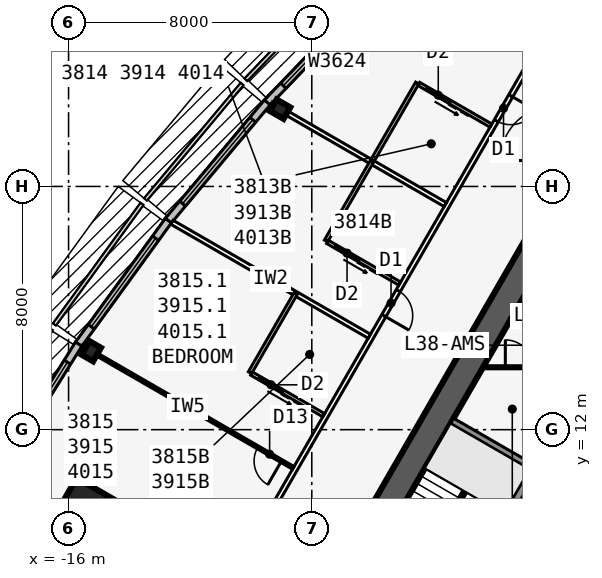
"""IFC4 building model, lengths in metres.
Left out: names, types, materials, properties, quantities, classifications, styles, units other than length and angle.
Written with IfcOpenShell. Run it as: python <this file> out.ifc"""

import sys

from ifc_helpers import new_model, si_unit, direction, frame, frame_2d, origin, origin_2d, place, context, subcontext, project, spatial, rectangle, i_section, extrude, element, fill, save


model = new_model("IFC4")
c1 = context("Model", 3, precision=1e-05, world=origin(), true_north=direction((0.0, 1.0)))
c2 = subcontext(c1, "Body", "Model", "MODEL_VIEW")
j1 = project(units=[si_unit("LENGTHUNIT", "METRE"), si_unit("PLANEANGLEUNIT", "RADIAN")], contexts=[c1])
p1 = place(None, origin())
s1 = spatial("IfcSite", under=j1, at=p1, CompositionType="ELEMENT")
p2 = place(p1, origin())
s2 = spatial("IfcBuilding", under=s1, at=p2, CompositionType="ELEMENT")
p3 = place(p2, frame((0.0, 0.0, 145.3)))
s3 = spatial("IfcBuildingStorey", under=s2, at=p3, CompositionType="ELEMENT", Elevation=145.3)
p4 = place(p3, frame((0.0, 19.052, 0.0), z_axis=(0.0, 0.0, 1.0), x_axis=(-0.499999749417, -0.866025548458, 0.0)))
e1 = element("IfcWall", 1, at=p4, inside=s3, PredefinedType="SHEAR", context=c2, shape_type="SweptSolid", body=[
    extrude(rectangle(XDim=33.0, YDim=0.9, at=frame_2d((16.5, 0.0))), origin(), (0.0, 0.0, 1.0), 3.4),
])
p5 = place(p4, frame((14.15, 0.0, 0.0)))
e2 = element("IfcOpeningElement", 2, at=p5, cuts=e1, PredefinedType="OPENING", context=c2, shape_type="SweptSolid", body=[
    extrude(rectangle(XDim=1.8, YDim=2.13, at=frame_2d((0.9, 1.065))), frame((0.0, 0.46, 0.0), z_axis=(0.0, -1.0, 0.0), x_axis=(1.0, 0.0, 0.0)), (0.0, 0.0, 1.0), 0.92),
])
p6 = place(p4, frame((12.6, 0.0, 0.0)))
e3 = element("IfcOpeningElement", 3, at=p6, cuts=e1, PredefinedType="OPENING", context=c2, shape_type="SweptSolid", body=[
    extrude(rectangle(XDim=1.0, YDim=2.13, at=frame_2d((0.5, 1.065))), frame((0.0, 0.46, 0.0), z_axis=(0.0, -1.0, 0.0), x_axis=(1.0, 0.0, 0.0)), (0.0, 0.0, 1.0), 0.92),
])
p7 = place(p3, frame((-0.062, 11.794, 0.0), z_axis=(0.0, 0.0, 1.0), x_axis=(-0.500006680225, -0.86602154692, 0.0)))
e4 = element("IfcWall", 4, at=p7, inside=s3, PredefinedType="SOLIDWALL", context=c2, shape_type="SweptSolid", body=[
    extrude(rectangle(XDim=7.733, YDim=0.25, at=frame_2d((3.866, 0.0))), origin(), (0.0, 0.0, 1.0), 3.235),
])
p8 = place(p3, frame((-0.679, 10.727, 0.0), z_axis=(0.0, 0.0, 1.0), x_axis=(-0.866022959057, 0.500004234368, 0.0)))
e5 = element("IfcWall", 5, at=p8, inside=s3, PredefinedType="SOLIDWALL", context=c2, shape_type="SweptSolid", body=[
    extrude(rectangle(XDim=3.125, YDim=0.2, at=frame_2d((1.562, 0.0))), origin(), (0.0, 0.0, 1.0), 3.235),
])
for number, where, z_axis, x_axis in (
    (6, (-9.041, 22.541, 0.0), (0.0, 0.0, 1.0), (-0.5, -0.866, 0.0)),
    (7, (-15.254, 14.58, 0.0), (0.0, 0.0, 1.0), (-0.866, 0.5, 0.0)),
):
    element("IfcColumn", number, at=place(p3, frame(where, z_axis=z_axis, x_axis=x_axis)), inside=s3, PredefinedType="COLUMN", context=c2, shape_type="SweptSolid", body=[
        extrude(i_section(OverallWidth=0.437, OverallDepth=0.513, WebThickness=0.061, FlangeThickness=0.097, at=origin_2d()), origin(), (0.0, 0.0, 1.0), 3.4),
    ])
p9 = place(p3, frame((-15.312, 8.84, 0.0), z_axis=(0.0, 0.0, 1.0), x_axis=(-0.866025403784, 0.5, 0.0)))
e8 = element("IfcColumn", 8, at=p9, inside=s3, PredefinedType="COLUMN", context=c2, shape_type="SweptSolid", body=[
    extrude(rectangle(XDim=2.3, YDim=2.3, at=origin_2d()), origin(), (0.0, 0.0, 1.0), 3.4),
])
p10 = place(p3, frame((-5.91, 26.472, 0.0), z_axis=(0.0, 0.0, 1.0), x_axis=(-0.691719937936, -0.722165858693, 0.0)))
e9 = element("IfcWall", 9, at=p10, inside=s3, PredefinedType="STANDARD", context=c2, shape_type="SweptSolid", body=[
    extrude(rectangle(XDim=5.148, YDim=0.25, at=frame_2d((2.574, 0.0))), origin(), (0.0, 0.0, 1.0), 3.235),
])
p11 = place(p10, frame((0.774, 0.0, 0.45)))
e10 = element("IfcOpeningElement", 10, at=p11, cuts=e9, PredefinedType="OPENING", context=c2, shape_type="SweptSolid", body=[
    extrude(rectangle(XDim=3.6, YDim=2.4, at=frame_2d((1.8, 1.2))), frame((0.0, 0.135, 0.0), z_axis=(0.0, -1.0, 0.0), x_axis=(1.0, 0.0, 0.0)), (0.0, 0.0, 1.0), 0.27),
])
p12 = place(p3, frame((-9.465, 22.76, 0.0), z_axis=(0.0, 0.0, 1.0), x_axis=(-0.641810386606, -0.766863369607, 0.0)))
e11 = element("IfcWall", 11, at=p12, inside=s3, PredefinedType="STANDARD", context=c2, shape_type="SweptSolid", body=[
    extrude(rectangle(XDim=5.076, YDim=0.25, at=frame_2d((2.538, 0.0))), origin(), (0.0, 0.0, 1.0), 3.235),
])
p13 = place(p12, frame((0.738, 0.0, 0.45)))
e12 = element("IfcOpeningElement", 12, at=p13, cuts=e11, PredefinedType="OPENING", context=c2, shape_type="SweptSolid", body=[
    extrude(rectangle(XDim=3.6, YDim=2.4, at=frame_2d((1.8, 1.2))), frame((0.0, 0.135, 0.0), z_axis=(0.0, -1.0, 0.0), x_axis=(1.0, 0.0, 0.0)), (0.0, 0.0, 1.0), 0.27),
])
p14 = place(p3, frame((-12.718, 18.875, 0.0), z_axis=(0.0, 0.0, 1.0), x_axis=(-0.587669188412, -0.809101307001, 0.0)))
e13 = element("IfcWall", 13, at=p14, inside=s3, PredefinedType="STANDARD", context=c2, shape_type="SweptSolid", body=[
    extrude(rectangle(XDim=5.028, YDim=0.25, at=frame_2d((2.514, 0.0))), origin(), (0.0, 0.0, 1.0), 3.235),
])
p15 = place(p14, frame((0.714, 0.0, 0.45)))
e14 = element("IfcOpeningElement", 14, at=p15, cuts=e13, PredefinedType="OPENING", context=c2, shape_type="SweptSolid", body=[
    extrude(rectangle(XDim=3.6, YDim=2.4, at=frame_2d((1.8, 1.2))), frame((0.0, 0.135, 0.0), z_axis=(0.0, -1.0, 0.0), x_axis=(1.0, 0.0, 0.0)), (0.0, 0.0, 1.0), 0.27),
])
p16 = place(p3, frame((-15.667, 14.814, 0.0), z_axis=(0.0, 0.0, 1.0), x_axis=(-0.529990167382, -0.84800378683, 0.0)))
e15 = element("IfcWall", 15, at=p16, inside=s3, PredefinedType="STANDARD", context=c2, shape_type="SweptSolid", body=[
    extrude(rectangle(XDim=5.003, YDim=0.25, at=frame_2d((2.501, 0.0))), origin(), (0.0, 0.0, 1.0), 3.235),
])
p17 = place(p16, frame((0.701, 0.0, 0.45)))
e16 = element("IfcOpeningElement", 16, at=p17, cuts=e15, PredefinedType="OPENING", context=c2, shape_type="SweptSolid", body=[
    extrude(rectangle(XDim=3.6, YDim=2.4, at=frame_2d((1.8, 1.2))), frame((0.0, 0.135, 0.0), z_axis=(0.0, -1.0, 0.0), x_axis=(1.0, 0.0, 0.0)), (0.0, 0.0, 1.0), 0.27),
])
p18 = place(p3, frame((-0.5, 24.636, 0.0), z_axis=(0.0, 0.0, 1.0), x_axis=(-0.500001915564, -0.86602429783, 0.0)))
e17 = element("IfcWall", 17, at=p18, inside=s3, PredefinedType="PARTITIONING", context=c2, shape_type="SweptSolid", body=[
    extrude(rectangle(XDim=42.172, YDim=0.15, at=frame_2d((21.086, 0.0))), origin(), (0.0, 0.0, 1.0), 3.235),
])
p19 = place(p18, frame((1.911, 0.0, 0.0)))
e18 = element("IfcOpeningElement", 18, at=p19, cuts=e17, PredefinedType="OPENING", context=c2, shape_type="SweptSolid", body=[
    extrude(rectangle(XDim=0.95, YDim=2.13, at=frame_2d((0.475, 1.065))), frame((0.0, 0.085, 0.0), z_axis=(0.0, -1.0, 0.0), x_axis=(1.0, 0.0, 0.0)), (0.0, 0.0, 1.0), 0.17),
])
p20 = place(p18, frame((9.311, 0.0, 0.0)))
e19 = element("IfcOpeningElement", 19, at=p20, cuts=e17, PredefinedType="OPENING", context=c2, shape_type="SweptSolid", body=[
    extrude(rectangle(XDim=0.95, YDim=2.13, at=frame_2d((0.475, 1.065))), frame((0.0, 0.085, 0.0), z_axis=(0.0, -1.0, 0.0), x_axis=(1.0, 0.0, 0.0)), (0.0, 0.0, 1.0), 0.17),
])
p21 = place(p18, frame((18.111, 0.0, 0.0)))
e20 = element("IfcOpeningElement", 20, at=p21, cuts=e17, PredefinedType="OPENING", context=c2, shape_type="SweptSolid", body=[
    extrude(rectangle(XDim=0.95, YDim=2.13, at=frame_2d((0.475, 1.065))), frame((0.0, 0.085, 0.0), z_axis=(0.0, -1.0, 0.0), x_axis=(1.0, 0.0, 0.0)), (0.0, 0.0, 1.0), 0.17),
])
p22 = place(p18, frame((29.311, 0.0, 0.0)))
e21 = element("IfcOpeningElement", 21, at=p22, cuts=e17, PredefinedType="OPENING", context=c2, shape_type="SweptSolid", body=[
    extrude(rectangle(XDim=0.95, YDim=2.13, at=frame_2d((0.475, 1.065))), frame((0.0, 0.085, 0.0), z_axis=(0.0, -1.0, 0.0), x_axis=(1.0, 0.0, 0.0)), (0.0, 0.0, 1.0), 0.17),
])
p23 = place(p18, frame((39.311, 0.0, 0.0)))
e22 = element("IfcOpeningElement", 22, at=p23, cuts=e17, PredefinedType="OPENING", context=c2, shape_type="SweptSolid", body=[
    extrude(rectangle(XDim=0.95, YDim=2.13, at=frame_2d((0.475, 1.065))), frame((0.0, 0.085, 0.0), z_axis=(0.0, -1.0, 0.0), x_axis=(1.0, 0.0, 0.0)), (0.0, 0.0, 1.0), 0.17),
])
p24 = place(p3, frame((-3.608, 19.404, 0.0), z_axis=(0.0, 0.0, 1.0), x_axis=(-0.866015989873, 0.500016305018, 0.0)))
e23 = element("IfcWall", 23, at=p24, inside=s3, PredefinedType="PARTITIONING", context=c2, shape_type="SweptSolid", body=[
    extrude(rectangle(XDim=6.616, YDim=0.15, at=frame_2d((3.308, 0.0))), origin(), (0.0, 0.0, 1.0), 2.389),
])
p25 = place(p3, frame((-6.108, 15.073, 0.0), z_axis=(0.0, 0.0, 1.0), x_axis=(-0.866025567496, 0.499999716443, 0.0)))
e24 = element("IfcWall", 24, at=p25, inside=s3, PredefinedType="PARTITIONING", context=c2, shape_type="SweptSolid", body=[
    extrude(rectangle(XDim=7.495, YDim=0.15, at=frame_2d((3.748, 0.0))), origin(), (0.0, 0.0, 1.0), 2.389),
])
p26 = place(p3, frame((-8.608, 10.743, 0.0), z_axis=(0.0, 0.0, 1.0), x_axis=(-0.866041663918, 0.499971835565, 0.0)))
e25 = element("IfcWall", 25, at=p26, inside=s3, PredefinedType="PARTITIONING", context=c2, shape_type="SweptSolid", body=[
    extrude(rectangle(XDim=8.022, YDim=0.1, at=frame_2d((4.011, 0.0))), origin(), (0.0, 0.0, 1.0), 2.389),
])
p27 = place(p26, frame((0.45, 0.0, 0.0)))
e26 = element("IfcOpeningElement", 26, at=p27, cuts=e25, PredefinedType="OPENING", context=c2, shape_type="SweptSolid", body=[
    extrude(rectangle(XDim=0.9, YDim=2.13, at=frame_2d((0.45, 1.065))), frame((0.0, 0.06, 0.0), z_axis=(0.0, -1.0, 0.0), x_axis=(1.0, 0.0, 0.0)), (0.0, 0.0, 1.0), 0.12),
])
p28 = place(p3, frame((-11.108, 6.413, 0.0), z_axis=(0.0, 0.0, 1.0), x_axis=(-0.866026407964, 0.499998260706, 0.0)))
e27 = element("IfcWall", 27, at=p28, inside=s3, PredefinedType="PARTITIONING", context=c2, shape_type="SweptSolid", body=[
    extrude(rectangle(XDim=8.199, YDim=0.1, at=frame_2d((4.099, 0.0))), origin(), (0.0, 0.0, 1.0), 2.389),
])
p29 = place(p28, frame((0.45, 0.0, 0.0)))
e28 = element("IfcOpeningElement", 28, at=p29, cuts=e27, PredefinedType="OPENING", context=c2, shape_type="SweptSolid", body=[
    extrude(rectangle(XDim=0.9, YDim=2.13, at=frame_2d((0.45, 1.065))), frame((0.0, 0.06, 0.0), z_axis=(0.0, -1.0, 0.0), x_axis=(1.0, 0.0, 0.0)), (0.0, 0.0, 1.0), 0.12),
])
p30 = place(p3, frame((-4.533, 23.402, 0.0), z_axis=(0.0, 0.0, 1.0), x_axis=(-0.499990139034, -0.866031096941, 0.0)))
e29 = element("IfcWall", 29, at=p30, inside=s3, PredefinedType="PLUMBINGWALL", context=c2, shape_type="SweptSolid", body=[
    extrude(rectangle(XDim=3.0, YDim=0.12, at=frame_2d((1.5, 0.0))), origin(), (0.0, 0.0, 1.0), 3.235),
])
p31 = place(p3, frame((-2.108, 22.002, 0.0), z_axis=(0.0, 0.0, 1.0), x_axis=(-0.866035715982, 0.499982138324, 0.0)))
e30 = element("IfcWall", 30, at=p31, inside=s3, PredefinedType="PLUMBINGWALL", context=c2, shape_type="SweptSolid", body=[
    extrude(rectangle(XDim=2.74, YDim=0.12, at=frame_2d((1.37, 0.0))), origin(), (0.0, 0.0, 1.0), 3.235),
])
p32 = place(p31, frame((1.55, 0.0, 0.0)))
e31 = element("IfcOpeningElement", 31, at=p32, cuts=e30, PredefinedType="OPENING", context=c2, shape_type="SweptSolid", body=[
    extrude(rectangle(XDim=0.9, YDim=2.13, at=frame_2d((0.45, 1.065))), frame((0.0, 0.07, 0.0), z_axis=(0.0, -1.0, 0.0), x_axis=(1.0, 0.0, 0.0)), (0.0, 0.0, 1.0), 0.14),
])
p33 = place(p3, frame((-6.033, 20.803, 0.0), z_axis=(0.0, 0.0, 1.0), x_axis=(-0.499990139034, -0.866031096941, 0.0)))
e32 = element("IfcWall", 32, at=p33, inside=s3, PredefinedType="PLUMBINGWALL", context=c2, shape_type="SweptSolid", body=[
    extrude(rectangle(XDim=3.0, YDim=0.12, at=frame_2d((1.5, 0.0))), origin(), (0.0, 0.0, 1.0), 3.235),
])
p34 = place(p3, frame((-5.108, 16.805, 0.0), z_axis=(0.0, 0.0, 1.0), x_axis=(-0.866035715982, 0.499982138324, 0.0)))
e33 = element("IfcWall", 33, at=p34, inside=s3, PredefinedType="PLUMBINGWALL", context=c2, shape_type="SweptSolid", body=[
    extrude(rectangle(XDim=2.74, YDim=0.12, at=frame_2d((1.37, 0.0))), origin(), (0.0, 0.0, 1.0), 3.235),
])
p35 = place(p34, frame((1.55, 0.0, 0.0)))
e34 = element("IfcOpeningElement", 34, at=p35, cuts=e33, PredefinedType="OPENING", context=c2, shape_type="SweptSolid", body=[
    extrude(rectangle(XDim=0.9, YDim=2.13, at=frame_2d((0.45, 1.065))), frame((0.0, 0.07, 0.0), z_axis=(0.0, -1.0, 0.0), x_axis=(1.0, 0.0, 0.0)), (0.0, 0.0, 1.0), 0.14),
])
p36 = place(p3, frame((-8.533, 16.473, 0.0), z_axis=(0.0, 0.0, 1.0), x_axis=(-0.499990139034, -0.866031096941, 0.0)))
e35 = element("IfcWall", 35, at=p36, inside=s3, PredefinedType="PLUMBINGWALL", context=c2, shape_type="SweptSolid", body=[
    extrude(rectangle(XDim=3.0, YDim=0.12, at=frame_2d((1.5, 0.0))), origin(), (0.0, 0.0, 1.0), 3.235),
])
p37 = place(p3, frame((-7.608, 12.475, 0.0), z_axis=(0.0, 0.0, 1.0), x_axis=(-0.866035715982, 0.499982138324, 0.0)))
e36 = element("IfcWall", 36, at=p37, inside=s3, PredefinedType="PLUMBINGWALL", context=c2, shape_type="SweptSolid", body=[
    extrude(rectangle(XDim=2.74, YDim=0.12, at=frame_2d((1.37, 0.0))), origin(), (0.0, 0.0, 1.0), 3.235),
])
p38 = place(p37, frame((1.55, 0.0, 0.0)))
e37 = element("IfcOpeningElement", 37, at=p38, cuts=e36, PredefinedType="OPENING", context=c2, shape_type="SweptSolid", body=[
    extrude(rectangle(XDim=0.9, YDim=2.13, at=frame_2d((0.45, 1.065))), frame((0.0, 0.07, 0.0), z_axis=(0.0, -1.0, 0.0), x_axis=(1.0, 0.0, 0.0)), (0.0, 0.0, 1.0), 0.14),
])
p39 = place(p3, frame((-1.501, 15.552, 0.0), z_axis=(0.0, 0.0, 1.0), x_axis=(1.0, 0.0, 0.0)))
e38 = element("IfcWall", 38, at=p39, inside=s3, PredefinedType="SOLIDWALL", context=c2, shape_type="SweptSolid", body=[
    extrude(rectangle(XDim=3.002, YDim=0.2, at=frame_2d((1.501, 0.0))), origin(), (0.0, 0.0, 1.0), 3.235),
])
p40 = place(p3, frame((-2.367, 14.052, 0.0), z_axis=(0.0, 0.0, 1.0), x_axis=(1.0, 0.0, 0.0)))
e39 = element("IfcWall", 39, at=p40, inside=s3, PredefinedType="PARTITIONING", context=c2, shape_type="SweptSolid", body=[
    extrude(rectangle(XDim=4.734, YDim=0.1, at=frame_2d((2.367, 0.0))), origin(), (0.0, 0.0, 1.0), 3.235),
])
p41 = place(p40, frame((0.734, 0.0, 0.0)))
e40 = element("IfcOpeningElement", 40, at=p41, cuts=e39, PredefinedType="OPENING", context=c2, shape_type="SweptSolid", body=[
    extrude(rectangle(XDim=0.9, YDim=2.13, at=frame_2d((0.45, 1.065))), frame((0.0, 0.06, 0.0), z_axis=(0.0, -1.0, 0.0), x_axis=(1.0, 0.0, 0.0)), (0.0, 0.0, 1.0), 0.12),
])
p42 = place(p3, frame((-2.988, 9.978, 0.0), z_axis=(0.0, 0.0, 1.0), x_axis=(-0.499992232847, -0.866029888106, 0.0)))
e41 = element("IfcWall", 41, at=p42, inside=s3, PredefinedType="SOLIDWALL", context=c2, shape_type="SweptSolid", body=[
    extrude(rectangle(XDim=2.794, YDim=0.1, at=frame_2d((1.397, 0.0))), origin(), (0.0, 0.0, 1.0), 3.4),
])
p43 = place(p11, origin())
e42 = element("IfcWindow", 42, at=p43, inside=s3, PartitioningType="SINGLE_PANEL", PredefinedType="WINDOW", context=c2, shape_type="SweptSolid", body=[
    extrude(rectangle(XDim=3.6, YDim=2.4, at=frame_2d((1.8, 1.2))), frame((0.0, 0.03, 0.0), z_axis=(0.0, -1.0, 0.0), x_axis=(1.0, 0.0, 0.0)), (0.0, 0.0, 1.0), 0.06),
])
fill(e10, e42)
p44 = place(p13, origin())
e43 = element("IfcWindow", 43, at=p44, inside=s3, PartitioningType="SINGLE_PANEL", PredefinedType="WINDOW", context=c2, shape_type="SweptSolid", body=[
    extrude(rectangle(XDim=3.6, YDim=2.4, at=frame_2d((1.8, 1.2))), frame((0.0, 0.03, 0.0), z_axis=(0.0, -1.0, 0.0), x_axis=(1.0, 0.0, 0.0)), (0.0, 0.0, 1.0), 0.06),
])
fill(e12, e43)
p45 = place(p15, origin())
e44 = element("IfcWindow", 44, at=p45, inside=s3, PartitioningType="SINGLE_PANEL", PredefinedType="WINDOW", context=c2, shape_type="SweptSolid", body=[
    extrude(rectangle(XDim=3.6, YDim=2.4, at=frame_2d((1.8, 1.2))), frame((0.0, 0.03, 0.0), z_axis=(0.0, -1.0, 0.0), x_axis=(1.0, 0.0, 0.0)), (0.0, 0.0, 1.0), 0.06),
])
fill(e14, e44)
p46 = place(p17, origin())
e45 = element("IfcWindow", 45, at=p46, inside=s3, PartitioningType="SINGLE_PANEL", PredefinedType="WINDOW", context=c2, shape_type="SweptSolid", body=[
    extrude(rectangle(XDim=3.6, YDim=2.4, at=frame_2d((1.8, 1.2))), frame((0.0, 0.03, 0.0), z_axis=(0.0, -1.0, 0.0), x_axis=(1.0, 0.0, 0.0)), (0.0, 0.0, 1.0), 0.06),
])
fill(e16, e45)
p47 = place(p27, origin())
e46 = element("IfcDoor", 46, at=p47, inside=s3, OperationType="SINGLE_SWING_LEFT", PredefinedType="DOOR", context=c2, shape_type="SweptSolid", body=[
    extrude(rectangle(XDim=0.9, YDim=2.13, at=frame_2d((0.45, 1.065))), frame((0.0, 0.025, 0.0), z_axis=(0.0, -1.0, 0.0), x_axis=(1.0, 0.0, 0.0)), (0.0, 0.0, 1.0), 0.05),
])
fill(e26, e46)
p48 = place(p32, origin())
e47 = element("IfcDoor", 47, at=p48, inside=s3, OperationType="SLIDING_TO_LEFT", PredefinedType="DOOR", context=c2, shape_type="SweptSolid", body=[
    extrude(rectangle(XDim=0.9, YDim=2.13, at=frame_2d((0.45, 1.065))), frame((0.0, 0.025, 0.0), z_axis=(0.0, -1.0, 0.0), x_axis=(1.0, 0.0, 0.0)), (0.0, 0.0, 1.0), 0.05),
])
fill(e31, e47)
p49 = place(p19, origin())
e48 = element("IfcDoor", 48, at=p49, inside=s3, OperationType="SINGLE_SWING_LEFT", PredefinedType="DOOR", context=c2, shape_type="SweptSolid", body=[
    extrude(rectangle(XDim=0.95, YDim=2.13, at=frame_2d((0.475, 1.065))), frame((0.0, 0.025, 0.0), z_axis=(0.0, -1.0, 0.0), x_axis=(1.0, 0.0, 0.0)), (0.0, 0.0, 1.0), 0.05),
])
fill(e18, e48)
p50 = place(p35, origin())
e49 = element("IfcDoor", 49, at=p50, inside=s3, OperationType="SLIDING_TO_LEFT", PredefinedType="DOOR", context=c2, shape_type="SweptSolid", body=[
    extrude(rectangle(XDim=0.9, YDim=2.13, at=frame_2d((0.45, 1.065))), frame((0.0, 0.025, 0.0), z_axis=(0.0, -1.0, 0.0), x_axis=(1.0, 0.0, 0.0)), (0.0, 0.0, 1.0), 0.05),
])
fill(e34, e49)
p51 = place(p20, origin())
e50 = element("IfcDoor", 50, at=p51, inside=s3, OperationType="SINGLE_SWING_RIGHT", PredefinedType="DOOR", context=c2, shape_type="SweptSolid", body=[
    extrude(rectangle(XDim=0.95, YDim=2.13, at=frame_2d((0.475, 1.065))), frame((0.0, 0.025, 0.0), z_axis=(0.0, -1.0, 0.0), x_axis=(1.0, 0.0, 0.0)), (0.0, 0.0, 1.0), 0.05),
])
fill(e19, e50)
p52 = place(p38, origin())
e51 = element("IfcDoor", 51, at=p52, inside=s3, OperationType="SLIDING_TO_LEFT", PredefinedType="DOOR", context=c2, shape_type="SweptSolid", body=[
    extrude(rectangle(XDim=0.9, YDim=2.13, at=frame_2d((0.45, 1.065))), frame((0.0, 0.025, 0.0), z_axis=(0.0, -1.0, 0.0), x_axis=(1.0, 0.0, 0.0)), (0.0, 0.0, 1.0), 0.05),
])
fill(e37, e51)
p53 = place(p41, origin())
e52 = element("IfcDoor", 52, at=p53, inside=s3, OperationType="SINGLE_SWING_LEFT", PredefinedType="DOOR", context=c2, shape_type="SweptSolid", body=[
    extrude(rectangle(XDim=0.9, YDim=2.13, at=frame_2d((0.45, 1.065))), frame((0.0, 0.025, 0.0), z_axis=(0.0, -1.0, 0.0), x_axis=(1.0, 0.0, 0.0)), (0.0, 0.0, 1.0), 0.05),
])
fill(e40, e52)
save(model, sys.argv[1])
